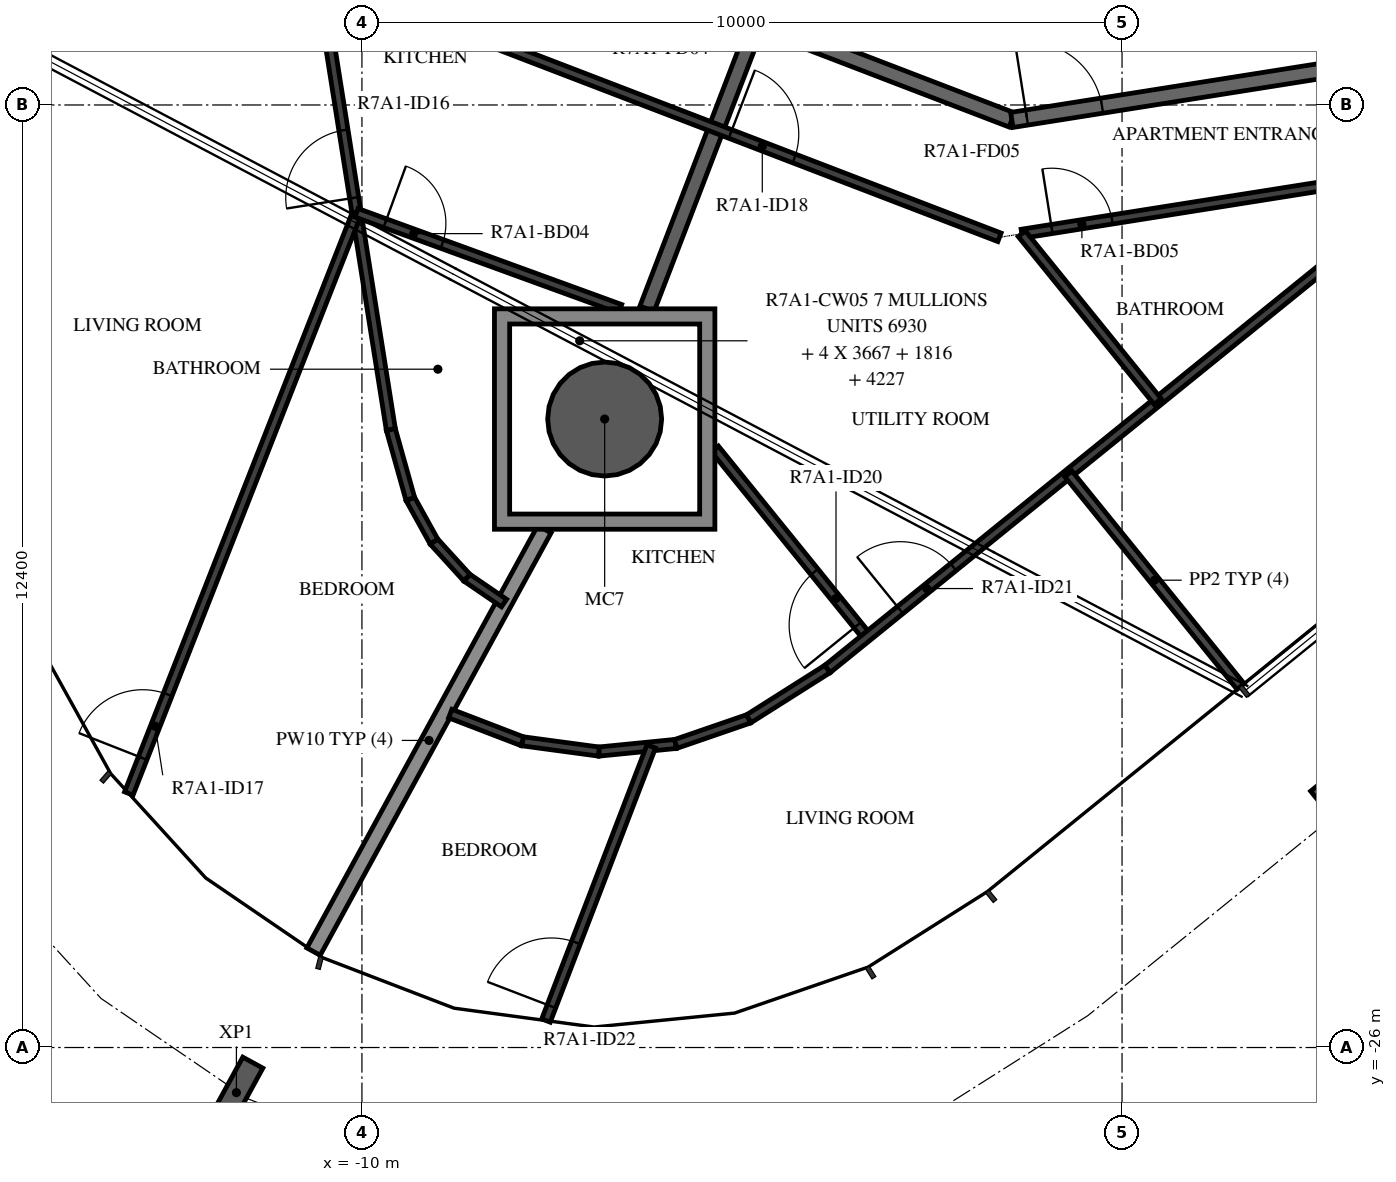
"""IFC4 building model, lengths in metres.
Left out: names, types, materials, properties, quantities, classifications, styles, units other than length and angle.
Written with IfcOpenShell. Run it as: python <this file> out.ifc"""

import sys

from ifc_helpers import new_model, si_unit, direction, frame, frame_2d, origin, origin_2d, place, context, subcontext, project, spatial, polyline, rectangle, hollow_circle, i_section, outline, extrude, element, fill, save


model = new_model("IFC4")
c1 = context("Model", 3, precision=1e-05, world=origin(), true_north=direction((0.0, 1.0)))
c2 = subcontext(c1, "Body", "Model", "MODEL_VIEW")
j1 = project(units=[si_unit("LENGTHUNIT", "METRE"), si_unit("PLANEANGLEUNIT", "RADIAN")], contexts=[c1])
p1 = place(None, origin())
s1 = spatial("IfcSite", under=j1, at=p1, CompositionType="ELEMENT")
p2 = place(p1, origin())
s2 = spatial("IfcBuilding", under=s1, at=p2, CompositionType="ELEMENT")
p3 = place(p2, frame((0.0, 0.0, 266.9)))
s3 = spatial("IfcBuildingStorey", under=s2, at=p3, CompositionType="ELEMENT", Elevation=266.9)
p4 = place(p3, frame((-6.807, -17.732, -0.38), z_axis=(0.0, 0.0, 1.0), x_axis=(1.0, 0.0, 0.0)))
e1 = element("IfcColumn", 1, at=p4, inside=s3, PredefinedType="COLUMN", context=c2, shape_type="SweptSolid", body=[
    extrude(hollow_circle(Radius=0.75, WallThickness=0.035, at=origin_2d()), origin(), (0.0, 0.0, 1.0), 3.5),
])
for number, where, z_axis, x_axis in (
    (2, (-11.652, -26.594, -0.38), (0.0, 0.0, 1.0), (-0.877, 0.48, 0.0)),
    (3, (2.881, -22.883, -0.38), (0.0, 0.0, 1.0), (-0.777, -0.629, 0.0)),
):
    element("IfcColumn", number, at=place(p3, frame(where, z_axis=z_axis, x_axis=x_axis)), inside=s3, PredefinedType="COLUMN", context=c2, shape_type="SweptSolid", body=[
        extrude(i_section(OverallWidth=0.3, OverallDepth=0.9, WebThickness=0.019, FlangeThickness=0.035, FilletRadius=0.03, at=origin_2d()), origin(), (0.0, 0.0, 1.0), 3.5),
    ])
p5 = place(p3, frame((-8.154, -11.223, 0.0), z_axis=(0.0, 0.0, 1.0), x_axis=(0.93359073609, -0.358341090983, 0.0)))
e4 = element("IfcWall", 4, at=p5, inside=s3, PredefinedType="STANDARD", context=c2, shape_type="SweptSolid", body=[
    extrude(rectangle(XDim=7.181, YDim=0.2, at=frame_2d((3.59, 0.0))), origin(), (0.0, 0.0, 1.0), 3.12),
])
p6 = place(p5, frame((2.39, 0.0, 0.0)))
e5 = element("IfcOpeningElement", 5, at=p6, cuts=e4, PredefinedType="OPENING", context=c2, shape_type="SweptSolid", body=[
    extrude(rectangle(XDim=1.0, YDim=2.1, at=frame_2d((0.5, 1.05))), frame((0.0, 0.11, 0.0), z_axis=(0.0, -1.0, 0.0), x_axis=(1.0, 0.0, 0.0)), (0.0, 0.0, 1.0), 0.22),
])
p7 = place(p3, frame((-1.45, -13.797, 0.0), z_axis=(0.0, 0.0, 1.0), x_axis=(0.987690361611, 0.156421704315, 0.0)))
e6 = element("IfcWall", 6, at=p7, inside=s3, PredefinedType="STANDARD", context=c2, shape_type="SweptSolid", body=[
    extrude(rectangle(XDim=7.181, YDim=0.2, at=frame_2d((3.591, 0.0))), origin(), (0.0, 0.0, 1.0), 3.12),
])
p8 = place(p7, frame((0.2, 0.0, 0.0)))
e7 = element("IfcOpeningElement", 7, at=p8, cuts=e6, PredefinedType="OPENING", context=c2, shape_type="SweptSolid", body=[
    extrude(rectangle(XDim=1.0, YDim=2.1, at=frame_2d((0.5, 1.05))), frame((0.0, 0.11, 0.0), z_axis=(0.0, -1.0, 0.0), x_axis=(1.0, 0.0, 0.0)), (0.0, 0.0, 1.0), 0.22),
])
p9 = place(p3, frame((-6.25, -16.282, 0.0), z_axis=(0.0, 0.0, 1.0), x_axis=(0.358351333512, 0.933586804625, 0.0)))
e8 = element("IfcWall", 8, at=p9, inside=s3, PredefinedType="STANDARD", context=c2, shape_type="SweptSolid", body=[
    extrude(rectangle(XDim=4.04, YDim=0.2, at=frame_2d((2.02, 0.0))), origin(), (0.0, 0.0, 1.0), 3.12),
])
p10 = place(p3, frame((-10.637, -24.738, 0.0), z_axis=(0.0, 0.0, 1.0), x_axis=(0.479683887596, 0.877441375808, 0.0)))
e9 = element("IfcWall", 9, at=p10, inside=s3, PredefinedType="STANDARD", context=c2, shape_type="SweptSolid", body=[
    extrude(rectangle(XDim=6.333, YDim=0.2, at=frame_2d((3.166, 0.0))), origin(), (0.0, 0.0, 1.0), 2.73),
])
p11 = place(p3, frame((-9.067, -12.479, 0.0), z_axis=(0.0, 0.0, 1.0), x_axis=(0.933579449035, -0.358370495911, 0.0)))
e10 = element("IfcWall", 10, at=p11, inside=s3, PredefinedType="PARTITIONING", context=c2, shape_type="SweptSolid", body=[
    extrude(rectangle(XDim=7.985, YDim=0.12, at=frame_2d((3.992, 0.0))), origin(), (0.0, 0.0, 1.0), 3.12),
])
p12 = place(p11, frame((4.192, 0.0, 0.0)))
e11 = element("IfcOpeningElement", 11, at=p12, cuts=e10, PredefinedType="OPENING", context=c2, shape_type="SweptSolid", body=[
    extrude(rectangle(XDim=0.9, YDim=2.1, at=frame_2d((0.45, 1.05))), frame((0.0, 0.07, 0.0), z_axis=(0.0, -1.0, 0.0), x_axis=(1.0, 0.0, 0.0)), (0.0, 0.0, 1.0), 0.14),
])
p13 = place(p3, frame((-9.619, -17.871, 0.0), z_axis=(0.0, 0.0, 1.0), x_axis=(-0.156433255633, 0.987688532146, 0.0)))
e12 = element("IfcWall", 12, at=p13, inside=s3, PredefinedType="PARTITIONING", context=c2, shape_type="SweptSolid", body=[
    extrude(rectangle(XDim=7.644, YDim=0.12, at=frame_2d((3.822, 0.0))), origin(), (0.0, 0.0, 1.0), 3.12),
])
p14 = place(p13, frame((3.087, 0.0, 0.0)))
e13 = element("IfcOpeningElement", 13, at=p14, cuts=e12, PredefinedType="OPENING", context=c2, shape_type="SweptSolid", body=[
    extrude(rectangle(XDim=0.9, YDim=2.1, at=frame_2d((0.45, 1.05))), frame((0.0, 0.07, 0.0), z_axis=(0.0, -1.0, 0.0), x_axis=(1.0, 0.0, 0.0)), (0.0, 0.0, 1.0), 0.14),
])
p15 = place(p3, frame((-13.067, -22.658, 0.0), z_axis=(0.0, 0.0, 1.0), x_axis=(0.365785999331, 0.930698986082, 0.0)))
e14 = element("IfcWall", 14, at=p15, inside=s3, PredefinedType="PARTITIONING", context=c2, shape_type="SweptSolid", body=[
    extrude(rectangle(XDim=8.196, YDim=0.12, at=frame_2d((4.098, 0.0))), origin(), (0.0, 0.0, 1.0), 3.12),
])
p16 = place(p15, frame((0.5, 0.0, 0.0)))
e15 = element("IfcOpeningElement", 15, at=p16, cuts=e14, PredefinedType="OPENING", context=c2, shape_type="SweptSolid", body=[
    extrude(rectangle(XDim=0.9, YDim=2.1, at=frame_2d((0.45, 1.05))), frame((0.0, 0.07, 0.0), z_axis=(0.0, -1.0, 0.0), x_axis=(1.0, 0.0, 0.0)), (0.0, 0.0, 1.0), 0.14),
])
p17 = place(p3, frame((-10.071, -15.019, 0.0), z_axis=(0.0, 0.0, 1.0), x_axis=(0.939648507355, -0.34214131967, 0.0)))
e16 = element("IfcWall", 16, at=p17, inside=s3, PredefinedType="PARTITIONING", context=c2, shape_type="SweptSolid", body=[
    extrude(rectangle(XDim=3.691, YDim=0.12, at=frame_2d((1.846, 0.0))), origin(), (0.0, 0.0, 1.0), 3.12),
])
p18 = place(p17, frame((0.4, 0.0, 0.0)))
e17 = element("IfcOpeningElement", 17, at=p18, cuts=e16, PredefinedType="OPENING", context=c2, shape_type="SweptSolid", body=[
    extrude(rectangle(XDim=0.8, YDim=2.1, at=frame_2d((0.4, 1.05))), frame((0.0, 0.07, 0.0), z_axis=(0.0, -1.0, 0.0), x_axis=(1.0, 0.0, 0.0)), (0.0, 0.0, 1.0), 0.14),
])
p19 = place(p3, frame((-8.13, -20.153, 0.0), z_axis=(0.0, 0.0, 1.0), x_axis=(-0.825599905246, 0.564255967145, 0.0)))
e18 = element("IfcWall", 18, at=p19, inside=s3, PredefinedType="PARTITIONING", context=c2, shape_type="SweptSolid", body=[
    extrude(rectangle(XDim=0.593, YDim=0.12, at=frame_2d((0.297, 0.0))), origin(), (0.0, 0.0, 1.0), 3.12),
])
for number, where, z_axis, x_axis in (
    (19, (-8.62, -19.818, 0.0), (0.0, 0.0, 1.0), (-0.673, 0.739, 0.0)),
    (20, (-9.052, -19.344, 0.0), (0.0, 0.0, 1.0), (-0.485, 0.874, 0.0)),
):
    element("IfcWall", number, at=place(p3, frame(where, z_axis=z_axis, x_axis=x_axis)), inside=s3, PredefinedType="PARTITIONING", context=c2, shape_type="SweptSolid", body=[
        extrude(rectangle(XDim=0.642, YDim=0.12, at=frame_2d((0.321, 0.0))), origin(), (0.0, 0.0, 1.0), 3.12),
    ])
p20 = place(p3, frame((-9.364, -18.782, 0.0), z_axis=(0.0, 0.0, 1.0), x_axis=(-0.269811707714, 0.962913102196, 0.0)))
e21 = element("IfcWall", 21, at=p20, inside=s3, PredefinedType="PARTITIONING", context=c2, shape_type="SweptSolid", body=[
    extrude(rectangle(XDim=0.947, YDim=0.12, at=frame_2d((0.473, 0.0))), origin(), (0.0, 0.0, 1.0), 3.12),
])
p21 = place(p3, frame((-1.318, -15.294, 0.0), z_axis=(0.0, 0.0, 1.0), x_axis=(0.987689040792, 0.156430044108, 0.0)))
e22 = element("IfcWall", 22, at=p21, inside=s3, PredefinedType="PARTITIONING", context=c2, shape_type="SweptSolid", body=[
    extrude(rectangle(XDim=7.616, YDim=0.12, at=frame_2d((3.808, 0.0))), origin(), (0.0, 0.0, 1.0), 3.12),
])
p22 = place(p21, frame((0.4, 0.0, 0.0)))
e23 = element("IfcOpeningElement", 23, at=p22, cuts=e22, PredefinedType="OPENING", context=c2, shape_type="SweptSolid", body=[
    extrude(rectangle(XDim=0.8, YDim=2.1, at=frame_2d((0.4, 1.05))), frame((0.0, 0.07, 0.0), z_axis=(0.0, -1.0, 0.0), x_axis=(1.0, 0.0, 0.0)), (0.0, 0.0, 1.0), 0.14),
])
p23 = place(p21, frame((5.88, 0.0, 0.0)))
e24 = element("IfcOpeningElement", 24, at=p23, cuts=e22, PredefinedType="OPENING", context=c2, shape_type="SweptSolid", body=[
    extrude(rectangle(XDim=0.9, YDim=2.1, at=frame_2d((0.45, 1.05))), frame((0.0, 0.07, 0.0), z_axis=(0.0, -1.0, 0.0), x_axis=(1.0, 0.0, 0.0)), (0.0, 0.0, 1.0), 0.14),
])
p24 = place(p3, frame((-5.872, -22.006, 0.0), z_axis=(0.0, 0.0, 1.0), x_axis=(-0.99510832942, -0.09878973995, 0.0)))
e25 = element("IfcWall", 25, at=p24, inside=s3, PredefinedType="PARTITIONING", context=c2, shape_type="SweptSolid", body=[
    extrude(rectangle(XDim=1.016, YDim=0.12, at=frame_2d((0.508, 0.0))), origin(), (0.0, 0.0, 1.0), 3.12),
])
p25 = place(p3, frame((-6.883, -22.106, 0.0), z_axis=(0.0, 0.0, 1.0), x_axis=(-0.991069822827, 0.133343939799, 0.0)))
e26 = element("IfcWall", 26, at=p25, inside=s3, PredefinedType="PARTITIONING", context=c2, shape_type="SweptSolid", body=[
    extrude(rectangle(XDim=1.016, YDim=0.12, at=frame_2d((0.508, 0.0))), origin(), (0.0, 0.0, 1.0), 3.12),
])
p26 = place(p3, frame((-7.89, -21.971, 0.0), z_axis=(0.0, 0.0, 1.0), x_axis=(-0.933574629243, 0.358383051545, 0.0)))
e27 = element("IfcWall", 27, at=p26, inside=s3, PredefinedType="PARTITIONING", context=c2, shape_type="SweptSolid", body=[
    extrude(rectangle(XDim=1.016, YDim=0.12, at=frame_2d((0.508, 0.0))), origin(), (0.0, 0.0, 1.0), 3.12),
])
p27 = place(p3, frame((-7.579, -25.646, 0.0), z_axis=(0.0, 0.0, 1.0), x_axis=(0.358314257596, 0.933601035134, 0.0)))
e28 = element("IfcWall", 28, at=p27, inside=s3, PredefinedType="PARTITIONING", context=c2, shape_type="SweptSolid", body=[
    extrude(rectangle(XDim=3.864, YDim=0.12, at=frame_2d((1.932, 0.0))), origin(), (0.0, 0.0, 1.0), 3.12),
])
p28 = place(p27, frame((0.2, 0.0, 0.0)))
e29 = element("IfcOpeningElement", 29, at=p28, cuts=e28, PredefinedType="OPENING", context=c2, shape_type="SweptSolid", body=[
    extrude(rectangle(XDim=0.9, YDim=2.1, at=frame_2d((0.45, 1.05))), frame((0.0, 0.07, 0.0), z_axis=(0.0, -1.0, 0.0), x_axis=(1.0, 0.0, 0.0)), (0.0, 0.0, 1.0), 0.14),
])
p29 = place(p3, frame((-3.354, -20.597, 0.0), z_axis=(0.0, 0.0, 1.0), x_axis=(-0.629352711751, 0.777119787556, 0.0)))
e30 = element("IfcWall", 30, at=p29, inside=s3, PredefinedType="PARTITIONING", context=c2, shape_type="SweptSolid", body=[
    extrude(rectangle(XDim=3.182, YDim=0.12, at=frame_2d((1.591, 0.0))), origin(), (0.0, 0.0, 1.0), 3.12),
])
p30 = place(p29, frame((0.2, 0.0, 0.0)))
e31 = element("IfcOpeningElement", 31, at=p30, cuts=e30, PredefinedType="OPENING", context=c2, shape_type="SweptSolid", body=[
    extrude(rectangle(XDim=0.9, YDim=2.1, at=frame_2d((0.45, 1.05))), frame((0.0, 0.07, 0.0), z_axis=(0.0, -1.0, 0.0), x_axis=(1.0, 0.0, 0.0)), (0.0, 0.0, 1.0), 0.14),
])
p31 = place(p3, frame((-5.872, -22.006, 0.0), z_axis=(0.0, 0.0, 1.0), x_axis=(0.945561838326, 0.325442483247, 0.0)))
e32 = element("IfcWall", 32, at=p31, inside=s3, PredefinedType="PARTITIONING", context=c2, shape_type="SweptSolid", body=[
    extrude(rectangle(XDim=1.016, YDim=0.12, at=frame_2d((0.508, 0.0))), origin(), (0.0, 0.0, 1.0), 3.12),
])
p32 = place(p3, frame((-4.912, -21.676, 0.0), z_axis=(0.0, 0.0, 1.0), x_axis=(0.84494492492, 0.534853319941, 0.0)))
e33 = element("IfcWall", 33, at=p32, inside=s3, PredefinedType="PARTITIONING", context=c2, shape_type="SweptSolid", body=[
    extrude(rectangle(XDim=1.228, YDim=0.12, at=frame_2d((0.614, 0.0))), origin(), (0.0, 0.0, 1.0), 3.12),
])
p33 = place(p3, frame((-3.875, -21.019, 0.0), z_axis=(0.0, 0.0, 1.0), x_axis=(0.777149096542, 0.629316519523, 0.0)))
e34 = element("IfcWall", 34, at=p33, inside=s3, PredefinedType="PARTITIONING", context=c2, shape_type="SweptSolid", body=[
    extrude(rectangle(XDim=10.508, YDim=0.12, at=frame_2d((5.254, 0.0))), origin(), (0.0, 0.0, 1.0), 3.12),
])
p34 = place(p33, frame((1.23, 0.0, 0.0)))
e35 = element("IfcOpeningElement", 35, at=p34, cuts=e34, PredefinedType="OPENING", context=c2, shape_type="SweptSolid", body=[
    extrude(rectangle(XDim=0.9, YDim=2.1, at=frame_2d((0.45, 1.05))), frame((0.0, 0.07, 0.0), z_axis=(0.0, -1.0, 0.0), x_axis=(1.0, 0.0, 0.0)), (0.0, 0.0, 1.0), 0.14),
])
p35 = place(p3, frame((0.469, -17.502, 0.0), z_axis=(0.0, 0.0, 1.0), x_axis=(-0.629307025607, 0.777156784389, 0.0)))
e36 = element("IfcWall", 36, at=p35, inside=s3, PredefinedType="PARTITIONING", context=c2, shape_type="SweptSolid", body=[
    extrude(rectangle(XDim=2.84, YDim=0.12, at=frame_2d((1.42, 0.0))), origin(), (0.0, 0.0, 1.0), 3.12),
])
p36 = place(p3, frame((1.56, -21.251, 0.0), z_axis=(0.0, 0.0, 1.0), x_axis=(-0.62934843781, 0.7771232488, 0.0)))
e37 = element("IfcWall", 37, at=p36, inside=s3, PredefinedType="PARTITIONING", context=c2, shape_type="SweptSolid", body=[
    extrude(rectangle(XDim=3.6, YDim=0.12, at=frame_2d((1.8, 0.0))), origin(), (0.0, 0.0, 1.0), 2.73),
])
p37 = place(p3, origin())
e38 = element("IfcWall", 38, at=p37, inside=s3, PredefinedType="STANDARD", context=c2, shape_type="SweptSolid", body=[
    extrude(outline(polyline([(-5.357, -16.282), (-5.357, -19.182), (-8.257, -19.182), (-8.257, -16.282), (-5.357, -16.282)]), holes=[polyline([(-8.057, -18.982), (-5.557, -18.982), (-5.557, -16.482), (-8.057, -16.482), (-8.057, -18.982)])]), origin(), (0.0, 0.0, 1.0), 3.12),
])
p38 = place(p14, origin())
e39 = element("IfcDoor", 39, at=p38, inside=s3, OperationType="SINGLE_SWING_RIGHT", PredefinedType="DOOR", context=c2, shape_type="SweptSolid", body=[
    extrude(rectangle(XDim=0.9, YDim=2.1, at=frame_2d((0.45, 1.05))), frame((0.0, 0.025, 0.0), z_axis=(0.0, -1.0, 0.0), x_axis=(1.0, 0.0, 0.0)), (0.0, 0.0, 1.0), 0.05),
])
fill(e13, e39)
p39 = place(p16, origin())
e40 = element("IfcDoor", 40, at=p39, inside=s3, OperationType="SINGLE_SWING_RIGHT", PredefinedType="DOOR", context=c2, shape_type="SweptSolid", body=[
    extrude(rectangle(XDim=0.9, YDim=2.1, at=frame_2d((0.45, 1.05))), frame((0.0, 0.025, 0.0), z_axis=(0.0, -1.0, 0.0), x_axis=(1.0, 0.0, 0.0)), (0.0, 0.0, 1.0), 0.05),
])
fill(e15, e40)
p40 = place(p18, origin())
e41 = element("IfcDoor", 41, at=p40, inside=s3, OperationType="SINGLE_SWING_RIGHT", PredefinedType="DOOR", context=c2, shape_type="SweptSolid", body=[
    extrude(rectangle(XDim=0.8, YDim=2.1, at=frame_2d((0.4, 1.05))), frame((0.0, 0.025, 0.0), z_axis=(0.0, -1.0, 0.0), x_axis=(1.0, 0.0, 0.0)), (0.0, 0.0, 1.0), 0.05),
])
fill(e17, e41)
p41 = place(p8, origin())
e42 = element("IfcDoor", 42, at=p41, inside=s3, OperationType="SINGLE_SWING_LEFT", PredefinedType="DOOR", context=c2, shape_type="SweptSolid", body=[
    extrude(rectangle(XDim=1.0, YDim=2.1, at=frame_2d((0.5, 1.05))), frame((0.0, 0.025, 0.0), z_axis=(0.0, -1.0, 0.0), x_axis=(1.0, 0.0, 0.0)), (0.0, 0.0, 1.0), 0.05),
])
fill(e7, e42)
p42 = place(p12, origin())
e43 = element("IfcDoor", 43, at=p42, inside=s3, OperationType="SINGLE_SWING_RIGHT", PredefinedType="DOOR", context=c2, shape_type="SweptSolid", body=[
    extrude(rectangle(XDim=0.9, YDim=2.1, at=frame_2d((0.45, 1.05))), frame((0.0, 0.025, 0.0), z_axis=(0.0, -1.0, 0.0), x_axis=(1.0, 0.0, 0.0)), (0.0, 0.0, 1.0), 0.05),
])
fill(e11, e43)
p43 = place(p22, origin())
e44 = element("IfcDoor", 44, at=p43, inside=s3, OperationType="SINGLE_SWING_LEFT", PredefinedType="DOOR", context=c2, shape_type="SweptSolid", body=[
    extrude(rectangle(XDim=0.8, YDim=2.1, at=frame_2d((0.4, 1.05))), frame((0.0, 0.025, 0.0), z_axis=(0.0, -1.0, 0.0), x_axis=(1.0, 0.0, 0.0)), (0.0, 0.0, 1.0), 0.05),
])
fill(e23, e44)
p44 = place(p30, origin())
e45 = element("IfcDoor", 45, at=p44, inside=s3, OperationType="SINGLE_SWING_LEFT", PredefinedType="DOOR", context=c2, shape_type="SweptSolid", body=[
    extrude(rectangle(XDim=0.9, YDim=2.1, at=frame_2d((0.45, 1.05))), frame((0.0, 0.025, 0.0), z_axis=(0.0, -1.0, 0.0), x_axis=(1.0, 0.0, 0.0)), (0.0, 0.0, 1.0), 0.05),
])
fill(e31, e45)
p45 = place(p34, origin())
e46 = element("IfcDoor", 46, at=p45, inside=s3, OperationType="SINGLE_SWING_LEFT", PredefinedType="DOOR", context=c2, shape_type="SweptSolid", body=[
    extrude(rectangle(XDim=0.9, YDim=2.1, at=frame_2d((0.45, 1.05))), frame((0.0, 0.025, 0.0), z_axis=(0.0, -1.0, 0.0), x_axis=(1.0, 0.0, 0.0)), (0.0, 0.0, 1.0), 0.05),
])
fill(e35, e46)
p46 = place(p28, origin())
e47 = element("IfcDoor", 47, at=p46, inside=s3, OperationType="SINGLE_SWING_LEFT", PredefinedType="DOOR", context=c2, shape_type="SweptSolid", body=[
    extrude(rectangle(XDim=0.9, YDim=2.1, at=frame_2d((0.45, 1.05))), frame((0.0, 0.025, 0.0), z_axis=(0.0, -1.0, 0.0), x_axis=(1.0, 0.0, 0.0)), (0.0, 0.0, 1.0), 0.05),
])
fill(e29, e47)
save(model, sys.argv[1])
